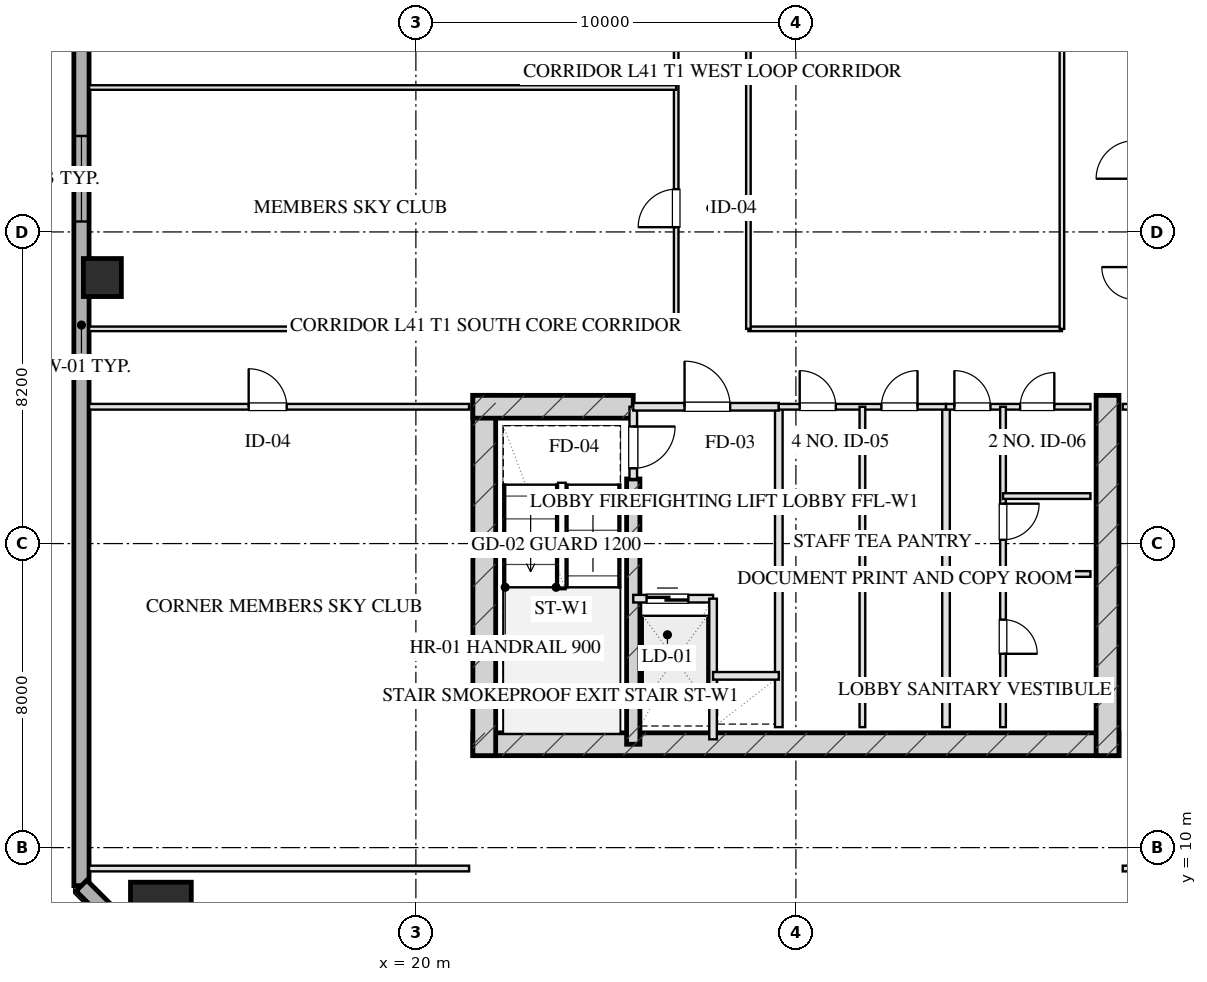
"""IFC4 building model, lengths in metres.
Left out: names, types, materials, properties, quantities, classifications, styles, units other than length and angle.
Written with IfcOpenShell. Run it as: python <this file> out.ifc"""

import sys

from ifc_helpers import new_model, si_unit, direction, frame, frame_2d, origin, origin_2d, place, context, subcontext, project, spatial, rectangle, hollow_rectangle, extrude, element, fill, save


model = new_model("IFC4")
c1 = context("Model", 3, precision=1e-05, world=origin(), true_north=direction((0.0, 1.0)))
c2 = subcontext(c1, "Body", "Model", "MODEL_VIEW")
j1 = project(units=[si_unit("LENGTHUNIT", "METRE"), si_unit("PLANEANGLEUNIT", "RADIAN")], contexts=[c1])
p1 = place(None, origin())
s1 = spatial("IfcSite", under=j1, at=p1, CompositionType="ELEMENT")
p2 = place(p1, origin())
s2 = spatial("IfcBuilding", under=s1, at=p2, CompositionType="ELEMENT")
p3 = place(p2, frame((0.0, 0.0, 156.4)))
s3 = spatial("IfcBuildingStorey", under=s2, at=p3, CompositionType="ELEMENT", Elevation=156.4)
p4 = place(p3, frame((21.5, 12.72, 0.0), z_axis=(0.0, 0.0, 1.0), x_axis=(1.0, 0.0, 0.0)))
e1 = element("IfcWall", 1, at=p4, inside=s3, PredefinedType="SHEAR", context=c2, shape_type="SweptSolid", body=[
    extrude(rectangle(XDim=17.0, YDim=0.6, at=frame_2d((8.5, 0.0))), origin(), (0.0, 0.0, 1.0), 3.45),
])
for number, where, z_axis, x_axis in (
    (2, (21.8, 21.9, 0.0), (0.0, 0.0, 1.0), (0.0, -1.0, 0.0)),
    (3, (38.2, 21.9, 0.0), (0.0, 0.0, 1.0), (0.0, -1.0, 0.0)),
):
    element("IfcWall", number, at=place(p3, frame(where, z_axis=z_axis, x_axis=x_axis)), inside=s3, PredefinedType="SHEAR", context=c2, shape_type="SweptSolid", body=[
        extrude(rectangle(XDim=9.48, YDim=0.6, at=frame_2d((4.74, 0.0))), origin(), (0.0, 0.0, 1.0), 3.45),
    ])
p5 = place(p3, frame((25.72, 19.7, 0.0), z_axis=(0.0, 0.0, 1.0), x_axis=(0.0, -1.0, 0.0)))
e4 = element("IfcWall", 4, at=p5, inside=s3, PredefinedType="SHEAR", context=c2, shape_type="SweptSolid", body=[
    extrude(rectangle(XDim=6.98, YDim=0.35, at=frame_2d((3.49, 0.0))), origin(), (0.0, 0.0, 1.0), 3.45),
])
p6 = place(p3, frame((21.5, 21.6, 0.0), z_axis=(0.0, 0.0, 1.0), x_axis=(1.0, 0.0, 0.0)))
e5 = element("IfcWall", 5, at=p6, inside=s3, PredefinedType="SHEAR", context=c2, shape_type="SweptSolid", body=[
    extrude(rectangle(XDim=4.22, YDim=0.6, at=frame_2d((2.11, 0.0))), origin(), (0.0, 0.0, 1.0), 3.45),
])
p7 = place(p3, frame((13.29, 8.29, 0.0), z_axis=(0.0, 0.0, 1.0), x_axis=(1.0, 0.0, 0.0)))
e6 = element("IfcColumn", 6, at=p7, inside=s3, PredefinedType="COLUMN", context=c2, shape_type="SweptSolid", body=[
    extrude(hollow_rectangle(XDim=1.6, YDim=1.6, WallThickness=0.055, at=origin_2d()), origin(), (0.0, 0.0, 1.0), 3.451),
])
p8 = place(p3, frame((11.75, 25.0, 0.0), z_axis=(0.0, 0.0, 1.0), x_axis=(1.0, 0.0, 0.0)))
e7 = element("IfcColumn", 7, at=p8, inside=s3, PredefinedType="COLUMN", context=c2, shape_type="SweptSolid", body=[
    extrude(hollow_rectangle(XDim=1.0, YDim=1.0, WallThickness=0.036, at=origin_2d()), origin(), (0.0, 0.0, 1.0), 3.451),
])
p9 = place(p3, frame((11.2, 9.0, 0.0), z_axis=(0.0, 0.0, 1.0), x_axis=(0.0, 1.0, 0.0)))
e8 = element("IfcWall", 8, at=p9, inside=s3, PredefinedType="SOLIDWALL", context=c2, shape_type="SweptSolid", body=[
    extrude(rectangle(XDim=50.0, YDim=0.4, at=frame_2d((25.0, 0.0))), origin(), (0.0, 0.0, 1.0), 2.61),
])
p10 = place(p9, frame((17.475, 0.0, 0.75)))
e9 = element("IfcOpeningElement", 9, at=p10, cuts=e8, PredefinedType="OPENING", context=c2, shape_type="SweptSolid", body=[
    extrude(rectangle(XDim=2.25, YDim=1.46, at=frame_2d((1.125, 0.73))), frame((0.0, 0.21, 0.0), z_axis=(0.0, -1.0, 0.0), x_axis=(1.0, 0.0, 0.0)), (0.0, 0.0, 1.0), 0.42),
])
p11 = place(p9, frame((30.25, 0.0, 0.0)))
e10 = element("IfcOpeningElement", 10, at=p11, cuts=e8, PredefinedType="OPENING", context=c2, shape_type="SweptSolid", body=[
    extrude(rectangle(XDim=1.1, YDim=2.15, at=frame_2d((0.55, 1.075))), frame((0.0, 0.21, 0.0), z_axis=(0.0, -1.0, 0.0), x_axis=(1.0, 0.0, 0.0)), (0.0, 0.0, 1.0), 0.42),
])
p12 = place(p3, frame((14.0, 6.2, 0.0), z_axis=(0.0, 0.0, 1.0), x_axis=(-0.707106781187, 0.707106781187, 0.0)))
e11 = element("IfcWall", 11, at=p12, inside=s3, PredefinedType="SOLIDWALL", context=c2, shape_type="SweptSolid", body=[
    extrude(rectangle(XDim=3.96, YDim=0.4, at=frame_2d((1.98, 0.0))), origin(), (0.0, 0.0, 1.0), 2.61),
])
p13 = place(p3, frame((25.72, 21.6, 0.0), z_axis=(0.0, 0.0, 1.0), x_axis=(0.0, -1.0, 0.0)))
e12 = element("IfcWall", 12, at=p13, inside=s3, PredefinedType="PARTITIONING", context=c2, shape_type="SweptSolid", body=[
    extrude(rectangle(XDim=1.9, YDim=0.2, at=frame_2d((0.95, 0.0))), origin(), (0.0, 0.0, 1.0), 3.175),
])
p14 = place(p13, frame((0.52, 0.0, 0.0)))
e13 = element("IfcOpeningElement", 13, at=p14, cuts=e12, PredefinedType="OPENING", context=c2, shape_type="SweptSolid", body=[
    extrude(rectangle(XDim=1.1, YDim=2.05, at=frame_2d((0.55, 1.025))), frame((0.0, 0.11, 0.0), z_axis=(0.0, -1.0, 0.0), x_axis=(1.0, 0.0, 0.0)), (0.0, 0.0, 1.0), 0.22),
])
p15 = place(p3, frame((29.55, 21.6, 0.0), z_axis=(0.0, 0.0, 1.0), x_axis=(0.0, -1.0, 0.0)))
e14 = element("IfcWall", 14, at=p15, inside=s3, PredefinedType="PARTITIONING", context=c2, shape_type="SweptSolid", body=[
    extrude(rectangle(XDim=8.43, YDim=0.2, at=frame_2d((4.215, 0.0))), origin(), (0.0, 0.0, 1.0), 3.175),
])
p16 = place(p3, frame((25.72, 21.6, 0.0), z_axis=(0.0, 0.0, 1.0), x_axis=(1.0, 0.0, 0.0)))
e15 = element("IfcWall", 15, at=p16, inside=s3, PredefinedType="PARTITIONING", context=c2, shape_type="SweptSolid", body=[
    extrude(rectangle(XDim=3.83, YDim=0.2, at=frame_2d((1.915, 0.0))), origin(), (0.0, 0.0, 1.0), 3.175),
])
p17 = place(p16, frame((1.35, 0.0, 0.0)))
e16 = element("IfcOpeningElement", 16, at=p17, cuts=e15, PredefinedType="OPENING", context=c2, shape_type="SweptSolid", body=[
    extrude(rectangle(XDim=1.2, YDim=2.05, at=frame_2d((0.6, 1.025))), frame((0.0, 0.11, 0.0), z_axis=(0.0, -1.0, 0.0), x_axis=(1.0, 0.0, 0.0)), (0.0, 0.0, 1.0), 0.22),
])
p18 = place(p3, frame((25.72, 16.55, 0.0), z_axis=(0.0, 0.0, 1.0), x_axis=(1.0, 0.0, 0.0)))
e17 = element("IfcWall", 17, at=p18, inside=s3, PredefinedType="PARTITIONING", context=c2, shape_type="SweptSolid", body=[
    extrude(rectangle(XDim=2.1, YDim=0.2, at=frame_2d((1.05, 0.0))), origin(), (0.0, 0.0, 1.0), 3.175),
])
p19 = place(p18, frame((0.35, 0.0, 0.0)))
e18 = element("IfcOpeningElement", 18, at=p19, cuts=e17, PredefinedType="OPENING", context=c2, shape_type="SweptSolid", body=[
    extrude(rectangle(XDim=1.1, YDim=2.05, at=frame_2d((0.55, 1.025))), frame((0.0, 0.11, 0.0), z_axis=(0.0, -1.0, 0.0), x_axis=(1.0, 0.0, 0.0)), (0.0, 0.0, 1.0), 0.22),
])
p20 = place(p3, frame((27.82, 16.55, 0.0), z_axis=(0.0, 0.0, 1.0), x_axis=(0.0, -1.0, 0.0)))
e19 = element("IfcWall", 19, at=p20, inside=s3, PredefinedType="PARTITIONING", context=c2, shape_type="SweptSolid", body=[
    extrude(rectangle(XDim=3.7, YDim=0.2, at=frame_2d((1.85, 0.0))), origin(), (0.0, 0.0, 1.0), 3.175),
])
p21 = place(p3, frame((27.82, 14.52, 0.0), z_axis=(0.0, 0.0, 1.0), x_axis=(1.0, 0.0, 0.0)))
e20 = element("IfcWall", 20, at=p21, inside=s3, PredefinedType="PARTITIONING", context=c2, shape_type="SweptSolid", body=[
    extrude(rectangle(XDim=1.73, YDim=0.2, at=frame_2d((0.865, 0.0))), origin(), (0.0, 0.0, 1.0), 3.175),
])
p22 = place(p3, frame((33.95, 21.6, 0.0), z_axis=(0.0, 0.0, 1.0), x_axis=(0.0, -1.0, 0.0)))
e21 = element("IfcWall", 21, at=p22, inside=s3, PredefinedType="PARTITIONING", context=c2, shape_type="SweptSolid", body=[
    extrude(rectangle(XDim=8.43, YDim=0.2, at=frame_2d((4.215, 0.0))), origin(), (0.0, 0.0, 1.0), 3.175),
])
p23 = place(p3, frame((29.55, 21.6, 0.0), z_axis=(0.0, 0.0, 1.0), x_axis=(1.0, 0.0, 0.0)))
e22 = element("IfcWall", 22, at=p23, inside=s3, PredefinedType="PARTITIONING", context=c2, shape_type="SweptSolid", body=[
    extrude(rectangle(XDim=4.4, YDim=0.15, at=frame_2d((2.2, 0.0))), origin(), (0.0, 0.0, 1.0), 3.175),
])
p24 = place(p23, frame((0.55, 0.0, 0.0)))
e23 = element("IfcOpeningElement", 23, at=p24, cuts=e22, PredefinedType="OPENING", context=c2, shape_type="SweptSolid", body=[
    extrude(rectangle(XDim=0.95, YDim=2.05, at=frame_2d((0.475, 1.025))), frame((0.0, 0.085, 0.0), z_axis=(0.0, -1.0, 0.0), x_axis=(1.0, 0.0, 0.0)), (0.0, 0.0, 1.0), 0.17),
])
p25 = place(p23, frame((2.7, 0.0, 0.0)))
e24 = element("IfcOpeningElement", 24, at=p25, cuts=e22, PredefinedType="OPENING", context=c2, shape_type="SweptSolid", body=[
    extrude(rectangle(XDim=0.95, YDim=2.05, at=frame_2d((0.475, 1.025))), frame((0.0, 0.085, 0.0), z_axis=(0.0, -1.0, 0.0), x_axis=(1.0, 0.0, 0.0)), (0.0, 0.0, 1.0), 0.17),
])
p26 = place(p3, frame((31.75, 21.6, 0.0), z_axis=(0.0, 0.0, 1.0), x_axis=(0.0, -1.0, 0.0)))
e25 = element("IfcWall", 25, at=p26, inside=s3, PredefinedType="PARTITIONING", context=c2, shape_type="SweptSolid", body=[
    extrude(rectangle(XDim=8.43, YDim=0.15, at=frame_2d((4.215, 0.0))), origin(), (0.0, 0.0, 1.0), 3.175),
])
p27 = place(p3, frame((33.95, 21.6, 0.0), z_axis=(0.0, 0.0, 1.0), x_axis=(1.0, 0.0, 0.0)))
e26 = element("IfcWall", 26, at=p27, inside=s3, PredefinedType="PARTITIONING", context=c2, shape_type="SweptSolid", body=[
    extrude(rectangle(XDim=3.8, YDim=0.15, at=frame_2d((1.9, 0.0))), origin(), (0.0, 0.0, 1.0), 3.175),
])
p28 = place(p27, frame((0.22, 0.0, 0.0)))
e27 = element("IfcOpeningElement", 27, at=p28, cuts=e26, PredefinedType="OPENING", context=c2, shape_type="SweptSolid", body=[
    extrude(rectangle(XDim=0.95, YDim=2.05, at=frame_2d((0.475, 1.025))), frame((0.0, 0.085, 0.0), z_axis=(0.0, -1.0, 0.0), x_axis=(1.0, 0.0, 0.0)), (0.0, 0.0, 1.0), 0.17),
])
p29 = place(p27, frame((1.95, 0.0, 0.0)))
e28 = element("IfcOpeningElement", 28, at=p29, cuts=e26, PredefinedType="OPENING", context=c2, shape_type="SweptSolid", body=[
    extrude(rectangle(XDim=0.9, YDim=2.05, at=frame_2d((0.45, 1.025))), frame((0.0, 0.085, 0.0), z_axis=(0.0, -1.0, 0.0), x_axis=(1.0, 0.0, 0.0)), (0.0, 0.0, 1.0), 0.17),
])
p30 = place(p3, frame((35.45, 21.6, 0.0), z_axis=(0.0, 0.0, 1.0), x_axis=(0.0, -1.0, 0.0)))
e29 = element("IfcWall", 29, at=p30, inside=s3, PredefinedType="PARTITIONING", context=c2, shape_type="SweptSolid", body=[
    extrude(rectangle(XDim=8.43, YDim=0.15, at=frame_2d((4.215, 0.0))), origin(), (0.0, 0.0, 1.0), 2.815),
])
p31 = place(p30, frame((2.55, 0.0, 0.0)))
e30 = element("IfcOpeningElement", 30, at=p31, cuts=e29, PredefinedType="OPENING", context=c2, shape_type="SweptSolid", body=[
    extrude(rectangle(XDim=0.95, YDim=2.05, at=frame_2d((0.475, 1.025))), frame((0.0, 0.085, 0.0), z_axis=(0.0, -1.0, 0.0), x_axis=(1.0, 0.0, 0.0)), (0.0, 0.0, 1.0), 0.17),
])
p32 = place(p30, frame((5.6, 0.0, 0.0)))
e31 = element("IfcOpeningElement", 31, at=p32, cuts=e29, PredefinedType="OPENING", context=c2, shape_type="SweptSolid", body=[
    extrude(rectangle(XDim=0.9, YDim=2.05, at=frame_2d((0.45, 1.025))), frame((0.0, 0.085, 0.0), z_axis=(0.0, -1.0, 0.0), x_axis=(1.0, 0.0, 0.0)), (0.0, 0.0, 1.0), 0.17),
])
for number, where, z_axis, x_axis in (
    (32, (35.45, 17.2, 0.0), (0.0, 0.0, 1.0), (1.0, 0.0, 0.0)),
    (33, (35.45, 19.25, 0.0), (0.0, 0.0, 1.0), (1.0, 0.0, 0.0)),
):
    element("IfcWall", number, at=place(p3, frame(where, z_axis=z_axis, x_axis=x_axis)), inside=s3, PredefinedType="PARTITIONING", context=c2, shape_type="SweptSolid", body=[
        extrude(rectangle(XDim=2.3, YDim=0.15, at=frame_2d((1.15, 0.0))), origin(), (0.0, 0.0, 1.0), 3.175),
    ])
p33 = place(p3, frame((11.4, 9.45, 0.0), z_axis=(0.0, 0.0, 1.0), x_axis=(1.0, 0.0, 0.0)))
e34 = element("IfcWall", 34, at=p33, inside=s3, PredefinedType="PARTITIONING", context=c2, shape_type="SweptSolid", body=[
    extrude(rectangle(XDim=10.0, YDim=0.15, at=frame_2d((5.0, 0.0))), origin(), (0.0, 0.0, 1.0), 3.175),
])
p34 = place(p3, frame((11.4, 21.6, 0.0), z_axis=(0.0, 0.0, 1.0), x_axis=(1.0, 0.0, 0.0)))
e35 = element("IfcWall", 35, at=p34, inside=s3, PredefinedType="PARTITIONING", context=c2, shape_type="SweptSolid", body=[
    extrude(rectangle(XDim=10.0, YDim=0.15, at=frame_2d((5.0, 0.0))), origin(), (0.0, 0.0, 1.0), 2.15),
])
p35 = place(p34, frame((4.2, 0.0, 0.0)))
e36 = element("IfcOpeningElement", 36, at=p35, cuts=e35, PredefinedType="OPENING", context=c2, shape_type="SweptSolid", body=[
    extrude(rectangle(XDim=1.0, YDim=2.05, at=frame_2d((0.5, 1.025))), frame((0.0, 0.085, 0.0), z_axis=(0.0, -1.0, 0.0), x_axis=(1.0, 0.0, 0.0)), (0.0, 0.0, 1.0), 0.17),
])
p36 = place(p3, frame((38.6, 9.45, 0.0), z_axis=(0.0, 0.0, 1.0), x_axis=(1.0, 0.0, 0.0)))
e37 = element("IfcWall", 37, at=p36, inside=s3, PredefinedType="PARTITIONING", context=c2, shape_type="SweptSolid", body=[
    extrude(rectangle(XDim=10.0, YDim=0.15, at=frame_2d((5.0, 0.0))), origin(), (0.0, 0.0, 1.0), 3.175),
])
p37 = place(p3, frame((38.6, 21.6, 0.0), z_axis=(0.0, 0.0, 1.0), x_axis=(1.0, 0.0, 0.0)))
e38 = element("IfcWall", 38, at=p37, inside=s3, PredefinedType="PARTITIONING", context=c2, shape_type="SweptSolid", body=[
    extrude(rectangle(XDim=10.0, YDim=0.15, at=frame_2d((5.0, 0.0))), origin(), (0.0, 0.0, 1.0), 2.15),
])
p38 = place(p37, frame((4.2, 0.0, 0.0)))
e39 = element("IfcOpeningElement", 39, at=p38, cuts=e38, PredefinedType="OPENING", context=c2, shape_type="SweptSolid", body=[
    extrude(rectangle(XDim=1.0, YDim=2.05, at=frame_2d((0.5, 1.025))), frame((0.0, 0.085, 0.0), z_axis=(0.0, -1.0, 0.0), x_axis=(1.0, 0.0, 0.0)), (0.0, 0.0, 1.0), 0.17),
])
p39 = place(p3, frame((11.4, 23.65, 0.0), z_axis=(0.0, 0.0, 1.0), x_axis=(1.0, 0.0, 0.0)))
e40 = element("IfcWall", 40, at=p39, inside=s3, PredefinedType="PARTITIONING", context=c2, shape_type="SweptSolid", body=[
    extrude(rectangle(XDim=15.45, YDim=0.12, at=frame_2d((7.725, 0.0))), origin(), (0.0, 0.0, 1.0), 2.15),
])
p40 = place(p3, frame((28.75, 23.65, 0.0), z_axis=(0.0, 0.0, 1.0), x_axis=(1.0, 0.0, 0.0)))
e41 = element("IfcWall", 41, at=p40, inside=s3, PredefinedType="PARTITIONING", context=c2, shape_type="SweptSolid", body=[
    extrude(rectangle(XDim=8.25, YDim=0.12, at=frame_2d((4.125, 0.0))), origin(), (0.0, 0.0, 1.0), 3.175),
])
p41 = place(p3, frame((26.85, 23.65, 0.0), z_axis=(0.0, 0.0, 1.0), x_axis=(0.0, 1.0, 0.0)))
e42 = element("IfcWall", 42, at=p41, inside=s3, PredefinedType="PARTITIONING", context=c2, shape_type="SweptSolid", body=[
    extrude(rectangle(XDim=20.7, YDim=0.12, at=frame_2d((10.35, 0.0))), origin(), (0.0, 0.0, 1.0), 3.175),
])
p42 = place(p41, frame((2.675, 0.0, 0.0)))
e43 = element("IfcOpeningElement", 43, at=p42, cuts=e42, PredefinedType="OPENING", context=c2, shape_type="SweptSolid", body=[
    extrude(rectangle(XDim=1.0, YDim=2.05, at=frame_2d((0.5, 1.025))), frame((0.0, 0.07, 0.0), z_axis=(0.0, -1.0, 0.0), x_axis=(1.0, 0.0, 0.0)), (0.0, 0.0, 1.0), 0.14),
])
p43 = place(p41, frame((9.85, 0.0, 0.0)))
e44 = element("IfcOpeningElement", 44, at=p43, cuts=e42, PredefinedType="OPENING", context=c2, shape_type="SweptSolid", body=[
    extrude(rectangle(XDim=1.05, YDim=2.05, at=frame_2d((0.525, 1.025))), frame((0.0, 0.07, 0.0), z_axis=(0.0, -1.0, 0.0), x_axis=(1.0, 0.0, 0.0)), (0.0, 0.0, 1.0), 0.14),
])
p44 = place(p41, frame((17.025, 0.0, 0.0)))
e45 = element("IfcOpeningElement", 45, at=p44, cuts=e42, PredefinedType="OPENING", context=c2, shape_type="SweptSolid", body=[
    extrude(rectangle(XDim=1.0, YDim=2.05, at=frame_2d((0.5, 1.025))), frame((0.0, 0.07, 0.0), z_axis=(0.0, -1.0, 0.0), x_axis=(1.0, 0.0, 0.0)), (0.0, 0.0, 1.0), 0.14),
])
p45 = place(p3, frame((28.75, 23.65, 0.0), z_axis=(0.0, 0.0, 1.0), x_axis=(0.0, 1.0, 0.0)))
e46 = element("IfcWall", 46, at=p45, inside=s3, PredefinedType="PARTITIONING", context=c2, shape_type="SweptSolid", body=[
    extrude(rectangle(XDim=20.7, YDim=0.12, at=frame_2d((10.35, 0.0))), origin(), (0.0, 0.0, 1.0), 3.175),
])
p46 = place(p45, frame((9.936, 0.0, 0.0)))
e47 = element("IfcOpeningElement", 47, at=p46, cuts=e46, PredefinedType="OPENING", context=c2, shape_type="SweptSolid", body=[
    extrude(rectangle(XDim=1.1, YDim=2.05, at=frame_2d((0.55, 1.025))), frame((0.0, 0.07, 0.0), z_axis=(0.0, -1.0, 0.0), x_axis=(1.0, 0.0, 0.0)), (0.0, 0.0, 1.0), 0.14),
])
p47 = place(p3, frame((37.0, 23.65, 0.0), z_axis=(0.0, 0.0, 1.0), x_axis=(0.0, 1.0, 0.0)))
e48 = element("IfcWall", 48, at=p47, inside=s3, PredefinedType="PARTITIONING", context=c2, shape_type="SweptSolid", body=[
    extrude(rectangle(XDim=20.7, YDim=0.12, at=frame_2d((10.35, 0.0))), origin(), (0.0, 0.0, 1.0), 3.175),
])
p48 = place(p3, frame((11.4, 30.0, 0.0), z_axis=(0.0, 0.0, 1.0), x_axis=(1.0, 0.0, 0.0)))
e49 = element("IfcWall", 49, at=p48, inside=s3, PredefinedType="PARTITIONING", context=c2, shape_type="SweptSolid", body=[
    extrude(rectangle(XDim=15.45, YDim=0.12, at=frame_2d((7.725, 0.0))), origin(), (0.0, 0.0, 1.0), 3.175),
])
p49 = place(p10, origin())
e50 = element("IfcWindow", 50, at=p49, inside=s3, PartitioningType="TRIPLE_PANEL_VERTICAL", PredefinedType="WINDOW", context=c2, shape_type="SweptSolid", body=[
    extrude(rectangle(XDim=2.25, YDim=1.46, at=frame_2d((1.125, 0.73))), frame((0.0, 0.03, 0.0), z_axis=(0.0, -1.0, 0.0), x_axis=(1.0, 0.0, 0.0)), (0.0, 0.0, 1.0), 0.06),
])
fill(e9, e50)
p50 = place(p14, origin())
e51 = element("IfcDoor", 51, at=p50, inside=s3, OperationType="SINGLE_SWING_LEFT", PredefinedType="DOOR", context=c2, shape_type="SweptSolid", body=[
    extrude(rectangle(XDim=1.1, YDim=2.05, at=frame_2d((0.55, 1.025))), frame((0.0, 0.025, 0.0), z_axis=(0.0, -1.0, 0.0), x_axis=(1.0, 0.0, 0.0)), (0.0, 0.0, 1.0), 0.05),
])
fill(e13, e51)
p51 = place(p17, origin())
e52 = element("IfcDoor", 52, at=p51, inside=s3, OperationType="SINGLE_SWING_LEFT", PredefinedType="DOOR", context=c2, shape_type="SweptSolid", body=[
    extrude(rectangle(XDim=1.2, YDim=2.05, at=frame_2d((0.6, 1.025))), frame((0.0, 0.025, 0.0), z_axis=(0.0, -1.0, 0.0), x_axis=(1.0, 0.0, 0.0)), (0.0, 0.0, 1.0), 0.05),
])
fill(e16, e52)
p52 = place(p19, origin())
e53 = element("IfcDoor", 53, at=p52, inside=s3, OperationType="DOUBLE_DOOR_SLIDING", PredefinedType="DOOR", context=c2, shape_type="SweptSolid", body=[
    extrude(rectangle(XDim=1.1, YDim=2.05, at=frame_2d((0.55, 1.025))), frame((0.0, 0.025, 0.0), z_axis=(0.0, -1.0, 0.0), x_axis=(1.0, 0.0, 0.0)), (0.0, 0.0, 1.0), 0.05),
])
fill(e18, e53)
p53 = place(p24, origin())
e54 = element("IfcDoor", 54, at=p53, inside=s3, OperationType="SINGLE_SWING_LEFT", PredefinedType="DOOR", context=c2, shape_type="SweptSolid", body=[
    extrude(rectangle(XDim=0.95, YDim=2.05, at=frame_2d((0.475, 1.025))), frame((0.0, 0.025, 0.0), z_axis=(0.0, -1.0, 0.0), x_axis=(1.0, 0.0, 0.0)), (0.0, 0.0, 1.0), 0.05),
])
fill(e23, e54)
p54 = place(p25, origin())
e55 = element("IfcDoor", 55, at=p54, inside=s3, OperationType="SINGLE_SWING_RIGHT", PredefinedType="DOOR", context=c2, shape_type="SweptSolid", body=[
    extrude(rectangle(XDim=0.95, YDim=2.05, at=frame_2d((0.475, 1.025))), frame((0.0, 0.025, 0.0), z_axis=(0.0, -1.0, 0.0), x_axis=(1.0, 0.0, 0.0)), (0.0, 0.0, 1.0), 0.05),
])
fill(e24, e55)
p55 = place(p28, origin())
e56 = element("IfcDoor", 56, at=p55, inside=s3, OperationType="SINGLE_SWING_LEFT", PredefinedType="DOOR", context=c2, shape_type="SweptSolid", body=[
    extrude(rectangle(XDim=0.95, YDim=2.05, at=frame_2d((0.475, 1.025))), frame((0.0, 0.025, 0.0), z_axis=(0.0, -1.0, 0.0), x_axis=(1.0, 0.0, 0.0)), (0.0, 0.0, 1.0), 0.05),
])
fill(e27, e56)
p56 = place(p29, origin())
e57 = element("IfcDoor", 57, at=p56, inside=s3, OperationType="SINGLE_SWING_RIGHT", PredefinedType="DOOR", context=c2, shape_type="SweptSolid", body=[
    extrude(rectangle(XDim=0.9, YDim=2.05, at=frame_2d((0.45, 1.025))), frame((0.0, 0.025, 0.0), z_axis=(0.0, -1.0, 0.0), x_axis=(1.0, 0.0, 0.0)), (0.0, 0.0, 1.0), 0.05),
])
fill(e28, e57)
p57 = place(p31, origin())
e58 = element("IfcDoor", 58, at=p57, inside=s3, OperationType="SINGLE_SWING_LEFT", PredefinedType="DOOR", context=c2, shape_type="SweptSolid", body=[
    extrude(rectangle(XDim=0.95, YDim=2.05, at=frame_2d((0.475, 1.025))), frame((0.0, 0.025, 0.0), z_axis=(0.0, -1.0, 0.0), x_axis=(1.0, 0.0, 0.0)), (0.0, 0.0, 1.0), 0.05),
])
fill(e30, e58)
p58 = place(p32, origin())
e59 = element("IfcDoor", 59, at=p58, inside=s3, OperationType="SINGLE_SWING_RIGHT", PredefinedType="DOOR", context=c2, shape_type="SweptSolid", body=[
    extrude(rectangle(XDim=0.9, YDim=2.05, at=frame_2d((0.45, 1.025))), frame((0.0, 0.025, 0.0), z_axis=(0.0, -1.0, 0.0), x_axis=(1.0, 0.0, 0.0)), (0.0, 0.0, 1.0), 0.05),
])
fill(e31, e59)
p59 = place(p35, origin())
e60 = element("IfcDoor", 60, at=p59, inside=s3, OperationType="SINGLE_SWING_LEFT", PredefinedType="DOOR", context=c2, shape_type="SweptSolid", body=[
    extrude(rectangle(XDim=1.0, YDim=2.05, at=frame_2d((0.5, 1.025))), frame((0.0, 0.025, 0.0), z_axis=(0.0, -1.0, 0.0), x_axis=(1.0, 0.0, 0.0)), (0.0, 0.0, 1.0), 0.05),
])
fill(e36, e60)
p60 = place(p42, origin())
e61 = element("IfcDoor", 61, at=p60, inside=s3, OperationType="SINGLE_SWING_LEFT", PredefinedType="DOOR", context=c2, shape_type="SweptSolid", body=[
    extrude(rectangle(XDim=1.0, YDim=2.05, at=frame_2d((0.5, 1.025))), frame((0.0, 0.025, 0.0), z_axis=(0.0, -1.0, 0.0), x_axis=(1.0, 0.0, 0.0)), (0.0, 0.0, 1.0), 0.05),
])
fill(e43, e61)
save(model, sys.argv[1])
